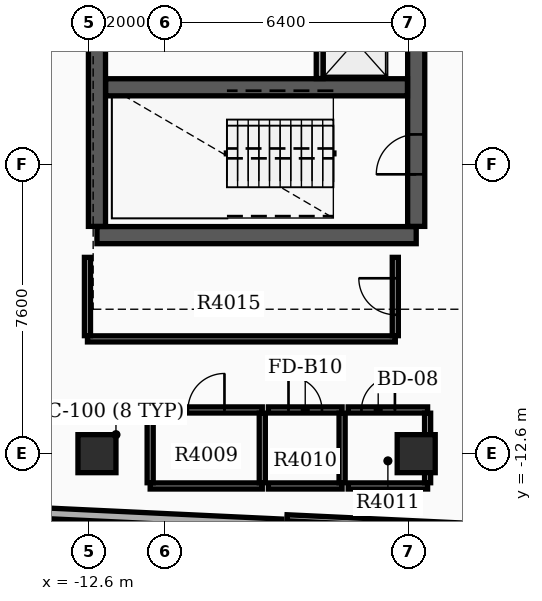
"""IFC4 building model, lengths in metres.
Left out: names, types, materials, properties, quantities, classifications, styles, units other than length and angle.
Written with IfcOpenShell. Run it as: python <this file> out.ifc"""

import sys

from ifc_helpers import new_model, si_unit, direction, frame, frame_2d, origin, origin_2d, place, context, subcontext, project, spatial, rectangle, extrude, element, fill, save


model = new_model("IFC4")
c1 = context("Model", 3, precision=1e-05, world=origin(), true_north=direction((0.0, 1.0)))
c2 = subcontext(c1, "Body", "Model", "MODEL_VIEW")
j1 = project(units=[si_unit("LENGTHUNIT", "METRE"), si_unit("PLANEANGLEUNIT", "RADIAN")], contexts=[c1])
p1 = place(None, origin())
s1 = spatial("IfcSite", under=j1, at=p1, CompositionType="ELEMENT")
p2 = place(p1, origin())
s2 = spatial("IfcBuilding", under=s1, at=p2, CompositionType="ELEMENT")
p3 = place(p2, frame((0.0, 0.0, 253.8)))
s3 = spatial("IfcBuildingStorey", under=s2, at=p3, CompositionType="ELEMENT", Elevation=253.8)
p4 = place(p3, frame((-12.4, -6.85, 0.0), z_axis=(0.0, 0.0, 1.0), x_axis=(1.0, 0.0, 0.0)))
e1 = element("IfcWall", 1, at=p4, inside=s3, PredefinedType="SHEAR", context=c2, shape_type="SweptSolid", body=[
    extrude(rectangle(XDim=8.4, YDim=0.45, at=frame_2d((4.2, 0.0))), origin(), (0.0, 0.0, 1.0), 3.7),
])
p5 = place(p3, frame((-12.4, -6.62, 0.0), z_axis=(0.0, 0.0, 1.0), x_axis=(0.0, 1.0, 0.0)))
e2 = element("IfcWall", 2, at=p5, inside=s3, PredefinedType="SHEAR", context=c2, shape_type="SweptSolid", body=[
    extrude(rectangle(XDim=11.34, YDim=0.45, at=frame_2d((5.67, 0.0))), origin(), (0.0, 0.0, 1.0), 3.7),
])
p6 = place(p3, frame((-4.0, -6.62, 0.0), z_axis=(0.0, 0.0, 1.0), x_axis=(0.0, 1.0, 0.0)))
e3 = element("IfcWall", 3, at=p6, inside=s3, PredefinedType="SHEAR", context=c2, shape_type="SweptSolid", body=[
    extrude(rectangle(XDim=11.34, YDim=0.45, at=frame_2d((5.67, 0.0))), origin(), (0.0, 0.0, 1.0), 3.7),
])
p7 = place(p6, frame((1.37, 0.0, 0.0)))
e4 = element("IfcOpeningElement", 4, at=p7, cuts=e3, PredefinedType="OPENING", context=c2, shape_type="SweptSolid", body=[
    extrude(rectangle(XDim=1.05, YDim=2.15, at=frame_2d((0.525, 1.075))), frame((0.0, 0.235, 0.0), z_axis=(0.0, -1.0, 0.0), x_axis=(1.0, 0.0, 0.0)), (0.0, 0.0, 1.0), 0.47),
])
p8 = place(p6, frame((6.97, 0.0, 0.0)))
e5 = element("IfcOpeningElement", 5, at=p8, cuts=e3, PredefinedType="OPENING", context=c2, shape_type="SweptSolid", body=[
    extrude(rectangle(XDim=1.05, YDim=2.15, at=frame_2d((0.525, 1.075))), frame((0.0, 0.235, 0.0), z_axis=(0.0, -1.0, 0.0), x_axis=(1.0, 0.0, 0.0)), (0.0, 0.0, 1.0), 0.47),
])
p9 = place(p3, frame((-12.17, -2.96, 0.0), z_axis=(0.0, 0.0, 1.0), x_axis=(1.0, 0.0, 0.0)))
e6 = element("IfcWall", 6, at=p9, inside=s3, PredefinedType="SHEAR", context=c2, shape_type="SweptSolid", body=[
    extrude(rectangle(XDim=7.94, YDim=0.45, at=frame_2d((3.97, 0.0))), origin(), (0.0, 0.0, 1.0), 3.7),
])
for number, where, z_axis, x_axis in (
    (7, (-12.4, -12.6, 0.0), (0.0, 0.0, 1.0), (1.0, 0.0, 0.0)),
    (8, (-4.0, -12.6, 0.0), (0.0, 0.0, 1.0), (1.0, 0.0, 0.0)),
):
    element("IfcColumn", number, at=place(p3, frame(where, z_axis=z_axis, x_axis=x_axis)), inside=s3, PredefinedType="COLUMN", context=c2, shape_type="SweptSolid", body=[
        extrude(rectangle(XDim=1.0, YDim=1.0, at=origin_2d()), origin(), (0.0, 0.0, 1.0), 3.9),
    ])
p10 = place(p3, frame((-13.843, -14.164, 0.0), z_axis=(0.0, 0.0, 1.0), x_axis=(0.998889082162, -0.047123258997, 0.0)))
e9 = element("IfcWall", 9, at=p10, inside=s3, PredefinedType="STANDARD", context=c2, shape_type="SweptSolid", body=[
    extrude(rectangle(XDim=6.3, YDim=0.28, at=frame_2d((3.15, 0.0))), origin(), (0.0, 0.0, 1.0), 3.18),
])
p11 = place(p3, frame((-6.54, -2.73, 0.0), z_axis=(0.0, 0.0, 1.0), x_axis=(0.0, 1.0, 0.0)))
e10 = element("IfcWall", 10, at=p11, inside=s3, PredefinedType="SOLIDWALL", context=c2, shape_type="SweptSolid", body=[
    extrude(rectangle(XDim=1.89, YDim=0.18, at=frame_2d((0.945, 0.0))), origin(), (0.0, 0.0, 1.0), 3.17),
])
p12 = place(p3, frame((-11.0, -13.45, 0.0), z_axis=(0.0, 0.0, 1.0), x_axis=(1.0, 0.0, 0.0)))
e11 = element("IfcWall", 11, at=p12, inside=s3, PredefinedType="PARTITIONING", context=c2, shape_type="SweptSolid", body=[
    extrude(rectangle(XDim=2.95, YDim=0.16, at=frame_2d((1.475, 0.0))), origin(), (0.0, 0.0, 1.0), 3.17),
])
p13 = place(p3, frame((-11.0, -11.45, 0.0), z_axis=(0.0, 0.0, 1.0), x_axis=(1.0, 0.0, 0.0)))
e12 = element("IfcWall", 12, at=p13, inside=s3, PredefinedType="PARTITIONING", context=c2, shape_type="SweptSolid", body=[
    extrude(rectangle(XDim=2.95, YDim=0.16, at=frame_2d((1.475, 0.0))), origin(), (0.0, 0.0, 1.0), 3.17),
])
p14 = place(p13, frame((0.995, 0.0, 0.0)))
e13 = element("IfcOpeningElement", 13, at=p14, cuts=e12, PredefinedType="OPENING", context=c2, shape_type="SweptSolid", body=[
    extrude(rectangle(XDim=0.96, YDim=2.15, at=frame_2d((0.48, 1.075))), frame((0.0, 0.09, 0.0), z_axis=(0.0, -1.0, 0.0), x_axis=(1.0, 0.0, 0.0)), (0.0, 0.0, 1.0), 0.18),
])
for number, where, z_axis, x_axis in (
    (14, (-11.0, -13.365, 0.0), (0.0, 0.0, 1.0), (0.0, 1.0, 0.0)),
    (15, (-8.05, -13.365, 0.0), (0.0, 0.0, 1.0), (0.0, 1.0, 0.0)),
):
    element("IfcWall", number, at=place(p3, frame(where, z_axis=z_axis, x_axis=x_axis)), inside=s3, PredefinedType="PARTITIONING", context=c2, shape_type="SweptSolid", body=[
        extrude(rectangle(XDim=1.83, YDim=0.16, at=frame_2d((0.915, 0.0))), origin(), (0.0, 0.0, 1.0), 3.17),
    ])
p15 = place(p3, frame((-7.89, -13.45, 0.0), z_axis=(0.0, 0.0, 1.0), x_axis=(1.0, 0.0, 0.0)))
e16 = element("IfcWall", 16, at=p15, inside=s3, PredefinedType="PARTITIONING", context=c2, shape_type="SweptSolid", body=[
    extrude(rectangle(XDim=1.94, YDim=0.16, at=frame_2d((0.97, 0.0))), origin(), (0.0, 0.0, 1.0), 3.17),
])
p16 = place(p3, frame((-7.89, -11.45, 0.0), z_axis=(0.0, 0.0, 1.0), x_axis=(1.0, 0.0, 0.0)))
e17 = element("IfcWall", 17, at=p16, inside=s3, PredefinedType="PARTITIONING", context=c2, shape_type="SweptSolid", body=[
    extrude(rectangle(XDim=1.94, YDim=0.16, at=frame_2d((0.97, 0.0))), origin(), (0.0, 0.0, 1.0), 3.17),
])
p17 = place(p16, frame((0.53, 0.0, 0.0)))
e18 = element("IfcOpeningElement", 18, at=p17, cuts=e17, PredefinedType="OPENING", context=c2, shape_type="SweptSolid", body=[
    extrude(rectangle(XDim=0.88, YDim=2.1, at=frame_2d((0.44, 1.05))), frame((0.0, 0.09, 0.0), z_axis=(0.0, -1.0, 0.0), x_axis=(1.0, 0.0, 0.0)), (0.0, 0.0, 1.0), 0.18),
])
p18 = place(p3, frame((-5.95, -13.365, 0.0), z_axis=(0.0, 0.0, 1.0), x_axis=(0.0, 1.0, 0.0)))
e19 = element("IfcWall", 19, at=p18, inside=s3, PredefinedType="PARTITIONING", context=c2, shape_type="SweptSolid", body=[
    extrude(rectangle(XDim=1.83, YDim=0.16, at=frame_2d((0.915, 0.0))), origin(), (0.0, 0.0, 1.0), 3.17),
])
p19 = place(p3, frame((-5.79, -13.45, 0.0), z_axis=(0.0, 0.0, 1.0), x_axis=(1.0, 0.0, 0.0)))
e20 = element("IfcWall", 20, at=p19, inside=s3, PredefinedType="PARTITIONING", context=c2, shape_type="SweptSolid", body=[
    extrude(rectangle(XDim=2.09, YDim=0.16, at=frame_2d((1.045, 0.0))), origin(), (0.0, 0.0, 1.0), 3.17),
])
p20 = place(p3, frame((-5.79, -11.45, 0.0), z_axis=(0.0, 0.0, 1.0), x_axis=(1.0, 0.0, 0.0)))
e21 = element("IfcWall", 21, at=p20, inside=s3, PredefinedType="PARTITIONING", context=c2, shape_type="SweptSolid", body=[
    extrude(rectangle(XDim=2.09, YDim=0.16, at=frame_2d((1.045, 0.0))), origin(), (0.0, 0.0, 1.0), 3.17),
])
p21 = place(p20, frame((0.35, 0.0, 0.0)))
e22 = element("IfcOpeningElement", 22, at=p21, cuts=e21, PredefinedType="OPENING", context=c2, shape_type="SweptSolid", body=[
    extrude(rectangle(XDim=0.88, YDim=2.15, at=frame_2d((0.44, 1.075))), frame((0.0, 0.09, 0.0), z_axis=(0.0, -1.0, 0.0), x_axis=(1.0, 0.0, 0.0)), (0.0, 0.0, 1.0), 0.18),
])
p22 = place(p3, frame((-3.7, -13.365, 0.0), z_axis=(0.0, 0.0, 1.0), x_axis=(0.0, 1.0, 0.0)))
e23 = element("IfcWall", 23, at=p22, inside=s3, PredefinedType="PARTITIONING", context=c2, shape_type="SweptSolid", body=[
    extrude(rectangle(XDim=1.83, YDim=0.16, at=frame_2d((0.915, 0.0))), origin(), (0.0, 0.0, 1.0), 3.17),
])
p23 = place(p3, frame((-12.65, -9.58, 0.0), z_axis=(0.0, 0.0, 1.0), x_axis=(1.0, 0.0, 0.0)))
e24 = element("IfcWall", 24, at=p23, inside=s3, PredefinedType="PARTITIONING", context=c2, shape_type="SweptSolid", body=[
    extrude(rectangle(XDim=8.1, YDim=0.16, at=frame_2d((4.05, 0.0))), origin(), (0.0, 0.0, 1.0), 3.17),
])
p24 = place(p3, frame((-12.65, -9.495, 0.0), z_axis=(0.0, 0.0, 1.0), x_axis=(0.0, 1.0, 0.0)))
e25 = element("IfcWall", 25, at=p24, inside=s3, PredefinedType="PARTITIONING", context=c2, shape_type="SweptSolid", body=[
    extrude(rectangle(XDim=2.06, YDim=0.16, at=frame_2d((1.03, 0.0))), origin(), (0.0, 0.0, 1.0), 3.17),
])
p25 = place(p3, frame((-4.55, -9.495, 0.0), z_axis=(0.0, 0.0, 1.0), x_axis=(0.0, 1.0, 0.0)))
e26 = element("IfcWall", 26, at=p25, inside=s3, PredefinedType="PARTITIONING", context=c2, shape_type="SweptSolid", body=[
    extrude(rectangle(XDim=2.06, YDim=0.16, at=frame_2d((1.03, 0.0))), origin(), (0.0, 0.0, 1.0), 3.17),
])
p26 = place(p25, frame((0.55, 0.0, 0.0)))
e27 = element("IfcOpeningElement", 27, at=p26, cuts=e26, PredefinedType="OPENING", context=c2, shape_type="SweptSolid", body=[
    extrude(rectangle(XDim=0.96, YDim=2.15, at=frame_2d((0.48, 1.075))), frame((0.0, 0.09, 0.0), z_axis=(0.0, -1.0, 0.0), x_axis=(1.0, 0.0, 0.0)), (0.0, 0.0, 1.0), 0.18),
])
p27 = place(p3, frame((-1.887, -14.547, 0.0), z_axis=(0.0, 0.0, 1.0), x_axis=(-0.998889946563, 0.04710493239, 0.0)))
e28 = element("IfcWall", 28, at=p27, inside=s3, PredefinedType="PARTITIONING", context=c2, shape_type="SweptSolid", body=[
    extrude(rectangle(XDim=5.52, YDim=0.16, at=frame_2d((2.76, 0.0))), origin(), (0.0, 0.0, 1.0), 3.17),
])
p28 = place(p7, origin())
e29 = element("IfcDoor", 29, at=p28, inside=s3, OperationType="SINGLE_SWING_LEFT", PredefinedType="DOOR", context=c2, shape_type="SweptSolid", body=[
    extrude(rectangle(XDim=1.05, YDim=2.15, at=frame_2d((0.525, 1.075))), frame((0.0, 0.025, 0.0), z_axis=(0.0, -1.0, 0.0), x_axis=(1.0, 0.0, 0.0)), (0.0, 0.0, 1.0), 0.05),
])
fill(e4, e29)
p29 = place(p14, origin())
e30 = element("IfcDoor", 30, at=p29, inside=s3, OperationType="SINGLE_SWING_RIGHT", PredefinedType="DOOR", context=c2, shape_type="SweptSolid", body=[
    extrude(rectangle(XDim=0.96, YDim=2.15, at=frame_2d((0.48, 1.075))), frame((0.0, 0.025, 0.0), z_axis=(0.0, -1.0, 0.0), x_axis=(1.0, 0.0, 0.0)), (0.0, 0.0, 1.0), 0.05),
])
fill(e13, e30)
p30 = place(p17, origin())
e31 = element("IfcDoor", 31, at=p30, inside=s3, OperationType="SINGLE_SWING_LEFT", PredefinedType="DOOR", context=c2, shape_type="SweptSolid", body=[
    extrude(rectangle(XDim=0.88, YDim=2.1, at=frame_2d((0.44, 1.05))), frame((0.0, 0.025, 0.0), z_axis=(0.0, -1.0, 0.0), x_axis=(1.0, 0.0, 0.0)), (0.0, 0.0, 1.0), 0.05),
])
fill(e18, e31)
p31 = place(p21, origin())
e32 = element("IfcDoor", 32, at=p31, inside=s3, OperationType="SINGLE_SWING_RIGHT", PredefinedType="DOOR", context=c2, shape_type="SweptSolid", body=[
    extrude(rectangle(XDim=0.88, YDim=2.15, at=frame_2d((0.44, 1.075))), frame((0.0, 0.025, 0.0), z_axis=(0.0, -1.0, 0.0), x_axis=(1.0, 0.0, 0.0)), (0.0, 0.0, 1.0), 0.05),
])
fill(e22, e32)
p32 = place(p26, origin())
e33 = element("IfcDoor", 33, at=p32, inside=s3, OperationType="SINGLE_SWING_RIGHT", PredefinedType="DOOR", context=c2, shape_type="SweptSolid", body=[
    extrude(rectangle(XDim=0.96, YDim=2.15, at=frame_2d((0.48, 1.075))), frame((0.0, 0.025, 0.0), z_axis=(0.0, -1.0, 0.0), x_axis=(1.0, 0.0, 0.0)), (0.0, 0.0, 1.0), 0.05),
])
fill(e27, e33)
save(model, sys.argv[1])
